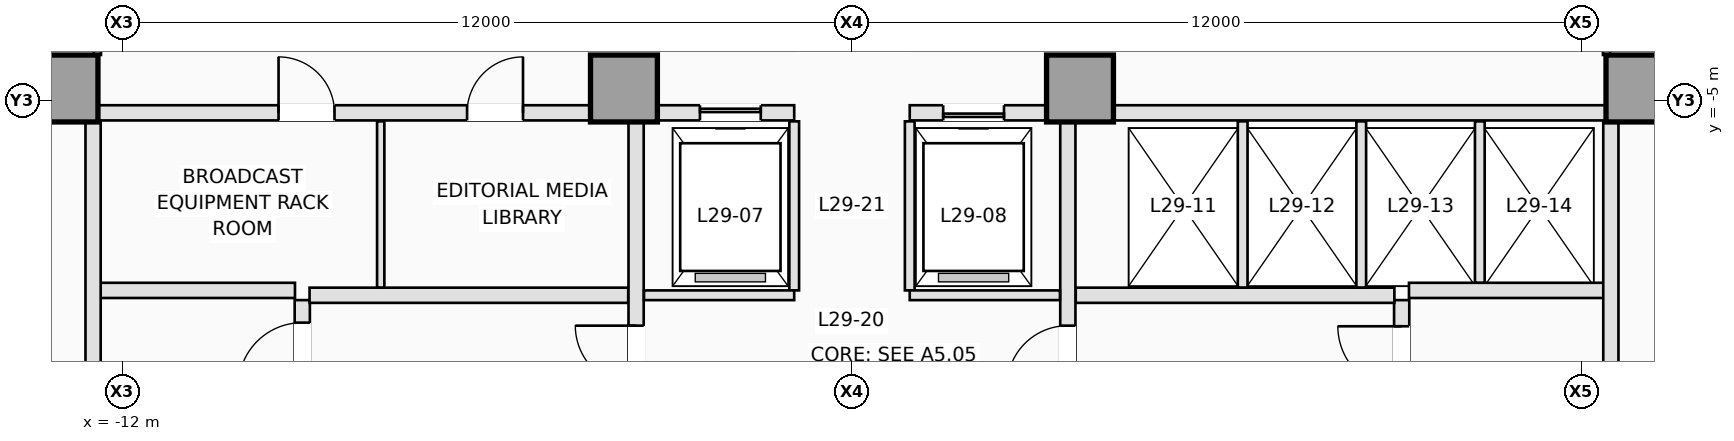
"""IFC4 building model, lengths in metres.
Left out: names, types, materials, properties, quantities, classifications, styles, units other than length and angle.
Written with IfcOpenShell. Run it as: python <this file> out.ifc"""

import sys

from ifc_helpers import new_model, si_unit, direction, frame, frame_2d, origin, origin_2d, place, context, subcontext, project, spatial, rectangle, extrude, element, fill, save


model = new_model("IFC4")
c1 = context("Model", 3, precision=1e-05, world=origin(), true_north=direction((0.0, 1.0)))
c2 = subcontext(c1, "Body", "Model", "MODEL_VIEW")
j1 = project(units=[si_unit("LENGTHUNIT", "METRE"), si_unit("PLANEANGLEUNIT", "RADIAN")], contexts=[c1])
p1 = place(None, origin())
s1 = spatial("IfcSite", under=j1, at=p1, CompositionType="ELEMENT")
p2 = place(p1, origin())
s2 = spatial("IfcBuilding", under=s1, at=p2, CompositionType="ELEMENT")
p3 = place(p2, frame((0.0, 0.0, 109.0)))
s3 = spatial("IfcBuildingStorey", under=s2, at=p3, CompositionType="ELEMENT", Elevation=109.0)
for number, where, z_axis, x_axis in (
    (1, (-12.95, -4.8, 0.0), (0.0, 0.0, 1.0), (1.0, 0.0, 0.0)),
    (2, (-3.75, -4.8, 0.0), (0.0, 0.0, 1.0), (1.0, 0.0, 0.0)),
    (3, (3.75, -4.8, 0.0), (0.0, 0.0, 1.0), (1.0, 0.0, 0.0)),
    (4, (12.95, -4.8, 0.0), (0.0, 0.0, 1.0), (1.0, 0.0, 0.0)),
):
    element("IfcColumn", number, at=place(p3, frame(where, z_axis=z_axis, x_axis=x_axis)), inside=s3, PredefinedType="COLUMN", context=c2, shape_type="SweptSolid", body=[
        extrude(rectangle(XDim=1.1, YDim=1.1, at=origin_2d()), origin(), (0.0, 0.0, 1.0), 3.5),
    ])
p4 = place(p3, frame((-9.04, -10.18, 0.0), z_axis=(0.0, 0.0, 1.0), x_axis=(0.0, 1.0, 0.0)))
e5 = element("IfcWall", 5, at=p4, inside=s3, PredefinedType="PARTITIONING", context=c2, shape_type="SweptSolid", body=[
    extrude(rectangle(XDim=1.9, YDim=0.25, at=frame_2d((0.95, 0.0))), origin(), (0.0, 0.0, 1.0), 3.25),
])
p5 = place(p4, frame((0.48, 0.0, 0.0)))
e6 = element("IfcOpeningElement", 6, at=p5, cuts=e5, PredefinedType="OPENING", context=c2, shape_type="SweptSolid", body=[
    extrude(rectangle(XDim=1.05, YDim=2.15, at=frame_2d((0.525, 1.075))), frame((0.0, 0.135, 0.0), z_axis=(0.0, -1.0, 0.0), x_axis=(1.0, 0.0, 0.0)), (0.0, 0.0, 1.0), 0.27),
])
p6 = place(p3, frame((9.04, -10.18, 0.0), z_axis=(0.0, 0.0, 1.0), x_axis=(0.0, 1.0, 0.0)))
e7 = element("IfcWall", 7, at=p6, inside=s3, PredefinedType="PARTITIONING", context=c2, shape_type="SweptSolid", body=[
    extrude(rectangle(XDim=1.9, YDim=0.25, at=frame_2d((0.95, 0.0))), origin(), (0.0, 0.0, 1.0), 3.25),
])
p7 = place(p6, frame((0.42, 0.0, 0.0)))
e8 = element("IfcOpeningElement", 8, at=p7, cuts=e7, PredefinedType="OPENING", context=c2, shape_type="SweptSolid", body=[
    extrude(rectangle(XDim=1.05, YDim=2.15, at=frame_2d((0.525, 1.075))), frame((0.0, 0.135, 0.0), z_axis=(0.0, -1.0, 0.0), x_axis=(1.0, 0.0, 0.0)), (0.0, 0.0, 1.0), 0.27),
])
for number, where, z_axis, x_axis in (
    (9, (-12.38, -8.12, 0.0), (0.0, 0.0, 1.0), (1.0, 0.0, 0.0)),
    (10, (9.16, -8.12, 0.0), (0.0, 0.0, 1.0), (1.0, 0.0, 0.0)),
):
    element("IfcWall", number, at=place(p3, frame(where, z_axis=z_axis, x_axis=x_axis)), inside=s3, PredefinedType="PARTITIONING", context=c2, shape_type="SweptSolid", body=[
        extrude(rectangle(XDim=3.22, YDim=0.25, at=frame_2d((1.61, 0.0))), origin(), (0.0, 0.0, 1.0), 3.25),
    ])
for number, where, z_axis, x_axis in (
    (11, (-12.48, -10.18, 0.0), (0.0, 0.0, 1.0), (0.0, 1.0, 0.0)),
    (12, (12.48, -10.18, 0.0), (0.0, 0.0, 1.0), (0.0, 1.0, 0.0)),
):
    element("IfcWall", number, at=place(p3, frame(where, z_axis=z_axis, x_axis=x_axis)), inside=s3, PredefinedType="PARTITIONING", context=c2, shape_type="SweptSolid", body=[
        extrude(rectangle(XDim=4.828, YDim=0.25, at=frame_2d((2.414, 0.0))), origin(), (0.0, 0.0, 1.0), 3.25),
    ])
for number, where, z_axis, x_axis in (
    (13, (-8.92, -8.2, 0.0), (0.0, 0.0, 1.0), (1.0, 0.0, 0.0)),
    (14, (3.68, -8.2, 0.0), (0.0, 0.0, 1.0), (1.0, 0.0, 0.0)),
):
    element("IfcWall", number, at=place(p3, frame(where, z_axis=z_axis, x_axis=x_axis)), inside=s3, PredefinedType="PARTITIONING", context=c2, shape_type="SweptSolid", body=[
        extrude(rectangle(XDim=5.24, YDim=0.25, at=frame_2d((2.62, 0.0))), origin(), (0.0, 0.0, 1.0), 3.25),
    ])
p8 = place(p3, frame((-3.55, -15.798, 0.0), z_axis=(0.0, 0.0, 1.0), x_axis=(0.0, 1.0, 0.0)))
e15 = element("IfcWall", 15, at=p8, inside=s3, PredefinedType="PARTITIONING", context=c2, shape_type="SweptSolid", body=[
    extrude(rectangle(XDim=10.446, YDim=0.25, at=frame_2d((5.223, 0.0))), origin(), (0.0, 0.0, 1.0), 3.25),
])
p9 = place(p8, frame((6.098, 0.0, 0.0)))
e16 = element("IfcOpeningElement", 16, at=p9, cuts=e15, PredefinedType="OPENING", context=c2, shape_type="SweptSolid", body=[
    extrude(rectangle(XDim=1.0, YDim=2.15, at=frame_2d((0.5, 1.075))), frame((0.0, 0.135, 0.0), z_axis=(0.0, -1.0, 0.0), x_axis=(1.0, 0.0, 0.0)), (0.0, 0.0, 1.0), 0.27),
])
p10 = place(p3, frame((3.55, -15.798, 0.0), z_axis=(0.0, 0.0, 1.0), x_axis=(0.0, 1.0, 0.0)))
e17 = element("IfcWall", 17, at=p10, inside=s3, PredefinedType="PARTITIONING", context=c2, shape_type="SweptSolid", body=[
    extrude(rectangle(XDim=10.446, YDim=0.25, at=frame_2d((5.223, 0.0))), origin(), (0.0, 0.0, 1.0), 3.25),
])
p11 = place(p10, frame((6.098, 0.0, 0.0)))
e18 = element("IfcOpeningElement", 18, at=p11, cuts=e17, PredefinedType="OPENING", context=c2, shape_type="SweptSolid", body=[
    extrude(rectangle(XDim=1.0, YDim=2.15, at=frame_2d((0.5, 1.075))), frame((0.0, 0.135, 0.0), z_axis=(0.0, -1.0, 0.0), x_axis=(1.0, 0.0, 0.0)), (0.0, 0.0, 1.0), 0.27),
])
p12 = place(p3, frame((-12.398, -5.2, 0.0), z_axis=(0.0, 0.0, 1.0), x_axis=(1.0, 0.0, 0.0)))
e19 = element("IfcWall", 19, at=p12, inside=s3, PredefinedType="PARTITIONING", context=c2, shape_type="SweptSolid", body=[
    extrude(rectangle(XDim=8.096, YDim=0.25, at=frame_2d((4.048, 0.0))), origin(), (0.0, 0.0, 1.0), 3.25),
])
p13 = place(p12, frame((2.968, 0.0, 0.0)))
e20 = element("IfcOpeningElement", 20, at=p13, cuts=e19, PredefinedType="OPENING", context=c2, shape_type="SweptSolid", body=[
    extrude(rectangle(XDim=0.92, YDim=2.12, at=frame_2d((0.46, 1.06))), frame((0.0, 0.135, 0.0), z_axis=(0.0, -1.0, 0.0), x_axis=(1.0, 0.0, 0.0)), (0.0, 0.0, 1.0), 0.27),
])
p14 = place(p12, frame((6.068, 0.0, 0.0)))
e21 = element("IfcOpeningElement", 21, at=p14, cuts=e19, PredefinedType="OPENING", context=c2, shape_type="SweptSolid", body=[
    extrude(rectangle(XDim=0.92, YDim=2.12, at=frame_2d((0.46, 1.06))), frame((0.0, 0.135, 0.0), z_axis=(0.0, -1.0, 0.0), x_axis=(1.0, 0.0, 0.0)), (0.0, 0.0, 1.0), 0.27),
])
p15 = place(p3, frame((4.302, -5.2, 0.0), z_axis=(0.0, 0.0, 1.0), x_axis=(1.0, 0.0, 0.0)))
e22 = element("IfcWall", 22, at=p15, inside=s3, PredefinedType="PARTITIONING", context=c2, shape_type="SweptSolid", body=[
    extrude(rectangle(XDim=8.096, YDim=0.25, at=frame_2d((4.048, 0.0))), origin(), (0.0, 0.0, 1.0), 3.25),
])
p16 = place(p3, frame((-3.198, -5.2, 0.0), z_axis=(0.0, 0.0, 1.0), x_axis=(1.0, 0.0, 0.0)))
e23 = element("IfcWall", 23, at=p16, inside=s3, PredefinedType="PARTITIONING", context=c2, shape_type="SweptSolid", body=[
    extrude(rectangle(XDim=2.248, YDim=0.25, at=frame_2d((1.124, 0.0))), origin(), (0.0, 0.0, 1.0), 3.25),
])
p17 = place(p16, frame((0.698, 0.0, 0.0)))
e24 = element("IfcOpeningElement", 24, at=p17, cuts=e23, PredefinedType="OPENING", context=c2, shape_type="SweptSolid", body=[
    extrude(rectangle(XDim=1.0, YDim=2.15, at=frame_2d((0.5, 1.075))), frame((0.0, 0.135, 0.0), z_axis=(0.0, -1.0, 0.0), x_axis=(1.0, 0.0, 0.0)), (0.0, 0.0, 1.0), 0.27),
])
p18 = place(p3, frame((0.95, -5.2, 0.0), z_axis=(0.0, 0.0, 1.0), x_axis=(1.0, 0.0, 0.0)))
e25 = element("IfcWall", 25, at=p18, inside=s3, PredefinedType="PARTITIONING", context=c2, shape_type="SweptSolid", body=[
    extrude(rectangle(XDim=2.248, YDim=0.25, at=frame_2d((1.124, 0.0))), origin(), (0.0, 0.0, 1.0), 3.25),
])
p19 = place(p18, frame((0.55, 0.0, 0.0)))
e26 = element("IfcOpeningElement", 26, at=p19, cuts=e25, PredefinedType="OPENING", context=c2, shape_type="SweptSolid", body=[
    extrude(rectangle(XDim=1.0, YDim=2.15, at=frame_2d((0.5, 1.075))), frame((0.0, 0.135, 0.0), z_axis=(0.0, -1.0, 0.0), x_axis=(1.0, 0.0, 0.0)), (0.0, 0.0, 1.0), 0.27),
])
p20 = place(p3, frame((-7.75, -8.073, 0.0), z_axis=(0.0, 0.0, 1.0), x_axis=(0.0, 1.0, 0.0)))
e27 = element("IfcWall", 27, at=p20, inside=s3, PredefinedType="PARTITIONING", context=c2, shape_type="SweptSolid", body=[
    extrude(rectangle(XDim=2.733, YDim=0.12, at=frame_2d((1.366, 0.0))), origin(), (0.0, 0.0, 1.0), 3.25),
])
for number, where, z_axis, x_axis in (
    (28, (6.425, -8.073, 0.0), (0.0, 0.0, 1.0), (0.0, 1.0, 0.0)),
    (29, (8.375, -8.073, 0.0), (0.0, 0.0, 1.0), (0.0, 1.0, 0.0)),
):
    element("IfcWall", number, at=place(p3, frame(where, z_axis=z_axis, x_axis=x_axis)), inside=s3, PredefinedType="PARTITIONING", context=c2, shape_type="SweptSolid", body=[
        extrude(rectangle(XDim=2.733, YDim=0.16, at=frame_2d((1.366, 0.0))), origin(), (0.0, 0.0, 1.0), 3.25),
    ])
p21 = place(p3, frame((10.325, -7.993, 0.0), z_axis=(0.0, 0.0, 1.0), x_axis=(0.0, 1.0, 0.0)))
e30 = element("IfcWall", 30, at=p21, inside=s3, PredefinedType="PARTITIONING", context=c2, shape_type="SweptSolid", body=[
    extrude(rectangle(XDim=2.653, YDim=0.16, at=frame_2d((1.326, 0.0))), origin(), (0.0, 0.0, 1.0), 3.25),
])
for number, where, z_axis, x_axis in (
    (31, (-0.95, -8.12, 0.0), (0.0, 0.0, 1.0), (0.0, 1.0, 0.0)),
    (32, (0.95, -8.12, 0.0), (0.0, 0.0, 1.0), (0.0, 1.0, 0.0)),
):
    element("IfcWall", number, at=place(p3, frame(where, z_axis=z_axis, x_axis=x_axis)), inside=s3, PredefinedType="PARTITIONING", context=c2, shape_type="SweptSolid", body=[
        extrude(rectangle(XDim=2.78, YDim=0.16, at=frame_2d((1.39, 0.0))), origin(), (0.0, 0.0, 1.0), 3.25),
    ])
for number, where, z_axis, x_axis in (
    (33, (-3.42, -8.2, 0.0), (0.0, 0.0, 1.0), (1.0, 0.0, 0.0)),
    (34, (0.95, -8.2, 0.0), (0.0, 0.0, 1.0), (1.0, 0.0, 0.0)),
):
    element("IfcWall", number, at=place(p3, frame(where, z_axis=z_axis, x_axis=x_axis)), inside=s3, PredefinedType="PARTITIONING", context=c2, shape_type="SweptSolid", body=[
        extrude(rectangle(XDim=2.47, YDim=0.16, at=frame_2d((1.235, 0.0))), origin(), (0.0, 0.0, 1.0), 3.25),
    ])
p22 = place(p3, frame((-12.41, -4.248, 0.0), z_axis=(0.0, 0.0, 1.0), x_axis=(0.0, 1.0, 0.0)))
e35 = element("IfcWall", 35, at=p22, inside=s3, PredefinedType="PARTITIONING", context=c2, shape_type="SweptSolid", body=[
    extrude(rectangle(XDim=1.848, YDim=0.12, at=frame_2d((0.924, 0.0))), origin(), (0.0, 0.0, 1.0), 3.25),
])
p23 = place(p3, frame((12.41, -2.462, 0.0), z_axis=(0.0, 0.0, 1.0), x_axis=(0.0, -1.0, 0.0)))
e36 = element("IfcWall", 36, at=p23, inside=s3, PredefinedType="PARTITIONING", context=c2, shape_type="SweptSolid", body=[
    extrude(rectangle(XDim=1.786, YDim=0.12, at=frame_2d((0.893, 0.0))), origin(), (0.0, 0.0, 1.0), 3.25),
])
p24 = place(p17, origin())
e37 = element("IfcDoor", 37, at=p24, inside=s3, OperationType="SLIDING_TO_LEFT", PredefinedType="DOOR", context=c2, shape_type="SweptSolid", body=[
    extrude(rectangle(XDim=1.0, YDim=2.15, at=frame_2d((0.5, 1.075))), frame((0.0, 0.025, 0.0), z_axis=(0.0, -1.0, 0.0), x_axis=(1.0, 0.0, 0.0)), (0.0, 0.0, 1.0), 0.05),
])
fill(e24, e37)
p25 = place(p19, origin())
e38 = element("IfcDoor", 38, at=p25, inside=s3, OperationType="SLIDING_TO_RIGHT", PredefinedType="DOOR", context=c2, shape_type="SweptSolid", body=[
    extrude(rectangle(XDim=1.0, YDim=2.15, at=frame_2d((0.5, 1.075))), frame((0.0, 0.025, 0.0), z_axis=(0.0, -1.0, 0.0), x_axis=(1.0, 0.0, 0.0)), (0.0, 0.0, 1.0), 0.05),
])
fill(e26, e38)
p26 = place(p5, origin())
e39 = element("IfcDoor", 39, at=p26, inside=s3, OperationType="SINGLE_SWING_LEFT", PredefinedType="DOOR", context=c2, shape_type="SweptSolid", body=[
    extrude(rectangle(XDim=1.05, YDim=2.15, at=frame_2d((0.525, 1.075))), frame((0.0, 0.025, 0.0), z_axis=(0.0, -1.0, 0.0), x_axis=(1.0, 0.0, 0.0)), (0.0, 0.0, 1.0), 0.05),
])
fill(e6, e39)
p27 = place(p7, origin())
e40 = element("IfcDoor", 40, at=p27, inside=s3, OperationType="SINGLE_SWING_RIGHT", PredefinedType="DOOR", context=c2, shape_type="SweptSolid", body=[
    extrude(rectangle(XDim=1.05, YDim=2.15, at=frame_2d((0.525, 1.075))), frame((0.0, 0.025, 0.0), z_axis=(0.0, -1.0, 0.0), x_axis=(1.0, 0.0, 0.0)), (0.0, 0.0, 1.0), 0.05),
])
fill(e8, e40)
p28 = place(p9, origin())
e41 = element("IfcDoor", 41, at=p28, inside=s3, OperationType="SINGLE_SWING_RIGHT", PredefinedType="DOOR", context=c2, shape_type="SweptSolid", body=[
    extrude(rectangle(XDim=1.0, YDim=2.15, at=frame_2d((0.5, 1.075))), frame((0.0, 0.025, 0.0), z_axis=(0.0, -1.0, 0.0), x_axis=(1.0, 0.0, 0.0)), (0.0, 0.0, 1.0), 0.05),
])
fill(e16, e41)
p29 = place(p11, origin())
e42 = element("IfcDoor", 42, at=p29, inside=s3, OperationType="SINGLE_SWING_LEFT", PredefinedType="DOOR", context=c2, shape_type="SweptSolid", body=[
    extrude(rectangle(XDim=1.0, YDim=2.15, at=frame_2d((0.5, 1.075))), frame((0.0, 0.025, 0.0), z_axis=(0.0, -1.0, 0.0), x_axis=(1.0, 0.0, 0.0)), (0.0, 0.0, 1.0), 0.05),
])
fill(e18, e42)
p30 = place(p13, origin())
e43 = element("IfcDoor", 43, at=p30, inside=s3, OperationType="SINGLE_SWING_LEFT", PredefinedType="DOOR", context=c2, shape_type="SweptSolid", body=[
    extrude(rectangle(XDim=0.92, YDim=2.12, at=frame_2d((0.46, 1.06))), frame((0.0, 0.025, 0.0), z_axis=(0.0, -1.0, 0.0), x_axis=(1.0, 0.0, 0.0)), (0.0, 0.0, 1.0), 0.05),
])
fill(e20, e43)
p31 = place(p14, origin())
e44 = element("IfcDoor", 44, at=p31, inside=s3, OperationType="SINGLE_SWING_RIGHT", PredefinedType="DOOR", context=c2, shape_type="SweptSolid", body=[
    extrude(rectangle(XDim=0.92, YDim=2.12, at=frame_2d((0.46, 1.06))), frame((0.0, 0.025, 0.0), z_axis=(0.0, -1.0, 0.0), x_axis=(1.0, 0.0, 0.0)), (0.0, 0.0, 1.0), 0.05),
])
fill(e21, e44)
save(model, sys.argv[1])
